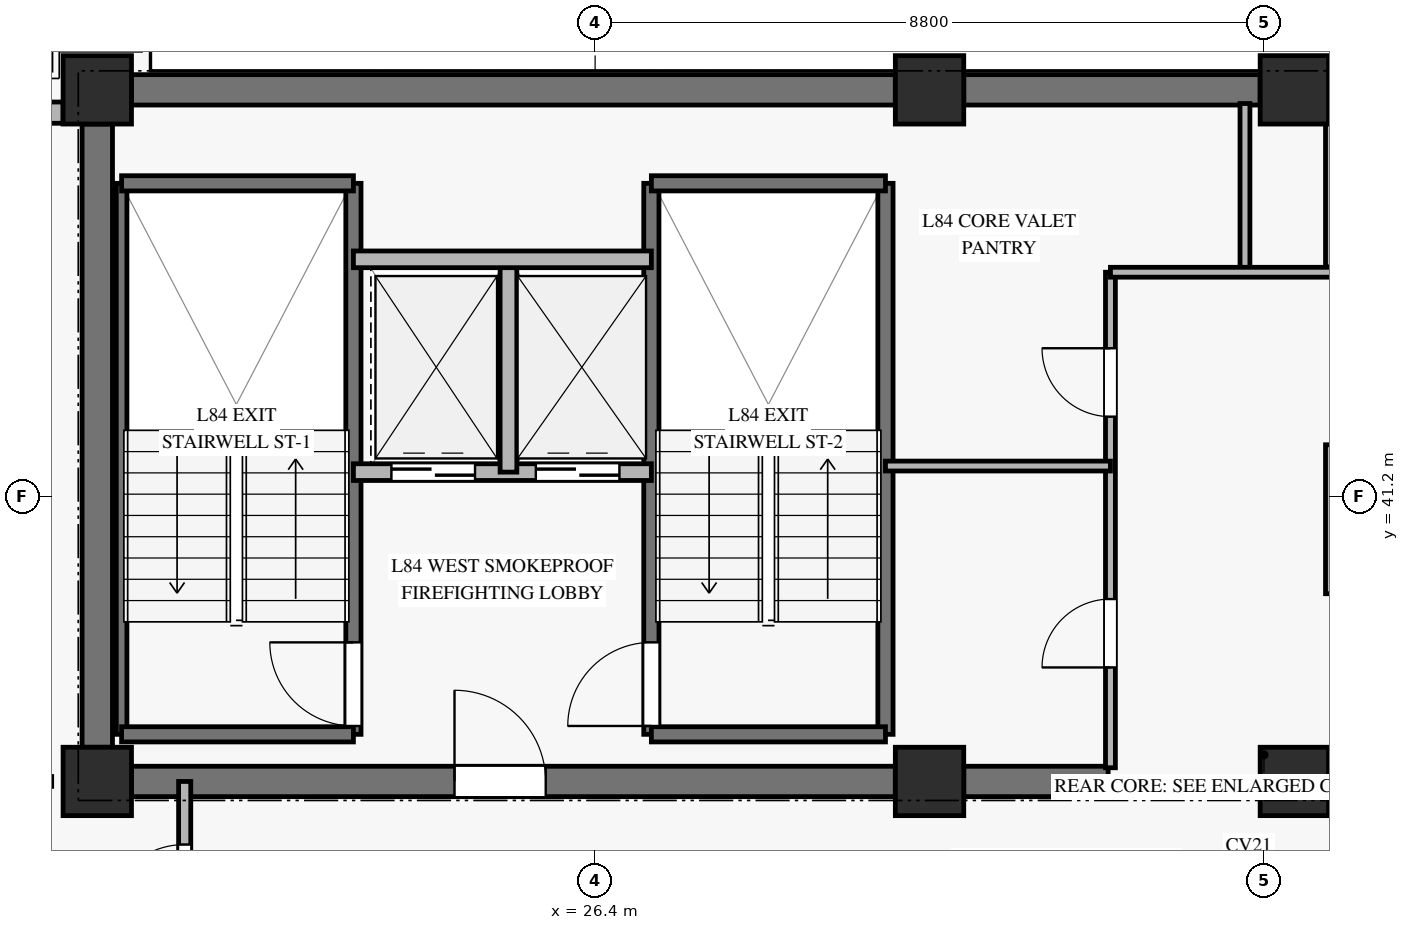
"""IFC4 building model, lengths in metres.
Left out: names, types, materials, properties, quantities, classifications, styles, units other than length and angle.
Written with IfcOpenShell. Run it as: python <this file> out.ifc"""

import sys

from ifc_helpers import new_model, si_unit, direction, frame, frame_2d, origin, origin_2d, place, context, subcontext, project, spatial, rectangle, extrude, source, transform, mapped, element, fill, save


model = new_model("IFC4")
c1 = context("Model", 3, precision=1e-05, world=origin(), true_north=direction((0.0, 1.0)))
c2 = subcontext(c1, "Body", "Model", "MODEL_VIEW")
j1 = project(units=[si_unit("LENGTHUNIT", "METRE"), si_unit("PLANEANGLEUNIT", "RADIAN")], contexts=[c1])
p1 = place(None, origin())
s1 = spatial("IfcSite", under=j1, at=p1, CompositionType="ELEMENT")
p2 = place(p1, origin())
s2 = spatial("IfcBuilding", under=s1, at=p2, CompositionType="ELEMENT")
p3 = place(p2, frame((0.0, 0.0, 324.4)))
s3 = spatial("IfcBuildingStorey", under=s2, at=p3, CompositionType="ELEMENT", Elevation=324.4)
m1 = source(origin(), c2, "Body", "SweptSolid", [
    extrude(rectangle(XDim=0.9, YDim=0.9, at=origin_2d()), origin(), (0.0, 0.0, 1.0), 3.12),
])
for number, where, z_axis, x_axis in (
    (1, (19.85, 37.45, 0.0), (0.0, 0.0, 1.0), (1.0, 0.0, 0.0)),
    (2, (19.85, 46.55, 0.0), (0.0, 0.0, 1.0), (1.0, 0.0, 0.0)),
    (3, (30.8, 37.45, 0.0), (0.0, 0.0, 1.0), (1.0, 0.0, 0.0)),
    (4, (30.8, 46.55, 0.0), (0.0, 0.0, 1.0), (1.0, 0.0, 0.0)),
    (5, (35.6, 37.45, 0.0), (0.0, 0.0, 1.0), (1.0, 0.0, 0.0)),
    (6, (35.6, 46.55, 0.0), (0.0, 0.0, 1.0), (1.0, 0.0, 0.0)),
):
    element("IfcColumn", number, at=place(p3, frame(where, z_axis=z_axis, x_axis=x_axis)), inside=s3, PredefinedType="PILASTER", context=c2, shape_type="MappedRepresentation", body=[
        mapped(m1, transform((0.0, 0.0, 0.0), x_axis=(1.0, 0.0, 0.0), y_axis=(0.0, 1.0, 0.0), z_axis=(0.0, 0.0, 1.0), scale=1.0)),
    ])
p4 = place(p3, frame((20.3, 46.55, 0.0), z_axis=(0.0, 0.0, 1.0), x_axis=(1.0, 0.0, 0.0)))
e7 = element("IfcWall", 7, at=p4, inside=s3, PredefinedType="SHEAR", context=c2, shape_type="SweptSolid", body=[
    extrude(rectangle(XDim=10.05, YDim=0.4, at=frame_2d((5.025, 0.0))), origin(), (0.0, 0.0, 1.0), 3.12),
])
p5 = place(p3, frame((31.25, 46.55, 0.0), z_axis=(0.0, 0.0, 1.0), x_axis=(1.0, 0.0, 0.0)))
e8 = element("IfcWall", 8, at=p5, inside=s3, PredefinedType="SHEAR", context=c2, shape_type="SweptSolid", body=[
    extrude(rectangle(XDim=3.9, YDim=0.4, at=frame_2d((1.95, 0.0))), origin(), (0.0, 0.0, 1.0), 3.12),
])
p6 = place(p3, frame((36.05, 46.55, 0.0), z_axis=(0.0, 0.0, 1.0), x_axis=(1.0, 0.0, 0.0)))
e9 = element("IfcWall", 9, at=p6, inside=s3, PredefinedType="SHEAR", context=c2, shape_type="SweptSolid", body=[
    extrude(rectangle(XDim=7.8, YDim=0.4, at=frame_2d((3.9, 0.0))), origin(), (0.0, 0.0, 1.0), 3.12),
])
p7 = place(p3, frame((20.3, 37.45, 0.0), z_axis=(0.0, 0.0, 1.0), x_axis=(1.0, 0.0, 0.0)))
e10 = element("IfcWall", 10, at=p7, inside=s3, PredefinedType="SHEAR", context=c2, shape_type="SweptSolid", body=[
    extrude(rectangle(XDim=10.05, YDim=0.4, at=frame_2d((5.025, 0.0))), origin(), (0.0, 0.0, 1.0), 3.12),
])
p8 = place(p7, frame((4.25, 0.0, 0.0)))
e11 = element("IfcOpeningElement", 11, at=p8, cuts=e10, PredefinedType="OPENING", context=c2, shape_type="SweptSolid", body=[
    extrude(rectangle(XDim=1.2, YDim=2.15, at=frame_2d((0.6, 1.075))), frame((0.0, 0.21, 0.0), z_axis=(0.0, -1.0, 0.0), x_axis=(1.0, 0.0, 0.0)), (0.0, 0.0, 1.0), 0.42),
])
p9 = place(p3, frame((31.25, 37.45, 0.0), z_axis=(0.0, 0.0, 1.0), x_axis=(1.0, 0.0, 0.0)))
e12 = element("IfcWall", 12, at=p9, inside=s3, PredefinedType="SHEAR", context=c2, shape_type="SweptSolid", body=[
    extrude(rectangle(XDim=1.9, YDim=0.4, at=frame_2d((0.95, 0.0))), origin(), (0.0, 0.0, 1.0), 3.12),
])
p10 = place(p3, frame((36.05, 37.45, 0.0), z_axis=(0.0, 0.0, 1.0), x_axis=(1.0, 0.0, 0.0)))
e13 = element("IfcWall", 13, at=p10, inside=s3, PredefinedType="SHEAR", context=c2, shape_type="SweptSolid", body=[
    extrude(rectangle(XDim=7.8, YDim=0.4, at=frame_2d((3.9, 0.0))), origin(), (0.0, 0.0, 1.0), 3.12),
])
p11 = place(p3, frame((19.85, 37.9, 0.0), z_axis=(0.0, 0.0, 1.0), x_axis=(0.0, 1.0, 0.0)))
e14 = element("IfcWall", 14, at=p11, inside=s3, PredefinedType="SHEAR", context=c2, shape_type="SweptSolid", body=[
    extrude(rectangle(XDim=8.2, YDim=0.4, at=frame_2d((4.1, 0.0))), origin(), (0.0, 0.0, 1.0), 3.12),
])
p12 = place(p3, frame((13.762, 46.25, 0.0), z_axis=(0.0, 0.0, 1.0), x_axis=(1.0, 0.0, 0.0)))
e15 = element("IfcWall", 15, at=p12, inside=s3, PredefinedType="SOLIDWALL", context=c2, shape_type="SweptSolid", body=[
    extrude(rectangle(XDim=5.638, YDim=0.28, at=frame_2d((2.819, 0.0))), origin(), (0.0, 0.0, 1.0), 2.75),
])
p13 = place(p12, frame((2.019, 0.0, 0.45)))
e16 = element("IfcOpeningElement", 16, at=p13, cuts=e15, PredefinedType="OPENING", context=c2, shape_type="SweptSolid", body=[
    extrude(rectangle(XDim=1.6, YDim=2.0, at=frame_2d((0.8, 1.0))), frame((0.0, 0.15, 0.0), z_axis=(0.0, -1.0, 0.0), x_axis=(1.0, 0.0, 0.0)), (0.0, 0.0, 1.0), 0.3),
])
p14 = place(p3, frame((20.17, 38.07, 0.0), z_axis=(0.0, 0.0, 1.0), x_axis=(0.0, 1.0, 0.0)))
e17 = element("IfcWall", 17, at=p14, inside=s3, PredefinedType="SOLIDWALL", context=c2, shape_type="SweptSolid", body=[
    extrude(rectangle(XDim=7.25, YDim=0.14, at=frame_2d((3.625, 0.0))), origin(), (0.0, 0.0, 1.0), 3.4),
])
p15 = place(p3, frame((23.22, 38.07, 0.0), z_axis=(0.0, 0.0, 1.0), x_axis=(0.0, 1.0, 0.0)))
e18 = element("IfcWall", 18, at=p15, inside=s3, PredefinedType="SOLIDWALL", context=c2, shape_type="SweptSolid", body=[
    extrude(rectangle(XDim=7.25, YDim=0.2, at=frame_2d((3.625, 0.0))), origin(), (0.0, 0.0, 1.0), 3.4),
])
p16 = place(p15, frame((0.11, 0.0, 0.0)))
e19 = element("IfcOpeningElement", 19, at=p16, cuts=e18, PredefinedType="OPENING", context=c2, shape_type="SweptSolid", body=[
    extrude(rectangle(XDim=1.1, YDim=2.15, at=frame_2d((0.55, 1.075))), frame((0.0, 0.11, 0.0), z_axis=(0.0, -1.0, 0.0), x_axis=(1.0, 0.0, 0.0)), (0.0, 0.0, 1.0), 0.22),
])
for number, where, z_axis, x_axis in (
    (20, (20.17, 45.32, 0.0), (0.0, 0.0, 1.0), (1.0, 0.0, 0.0)),
    (21, (20.17, 38.07, 0.0), (0.0, 0.0, 1.0), (1.0, 0.0, 0.0)),
):
    element("IfcWall", number, at=place(p3, frame(where, z_axis=z_axis, x_axis=x_axis)), inside=s3, PredefinedType="SOLIDWALL", context=c2, shape_type="SweptSolid", body=[
        extrude(rectangle(XDim=3.05, YDim=0.2, at=frame_2d((1.525, 0.0))), origin(), (0.0, 0.0, 1.0), 3.4),
    ])
p17 = place(p3, frame((27.14, 38.07, 0.0), z_axis=(0.0, 0.0, 1.0), x_axis=(0.0, 1.0, 0.0)))
e22 = element("IfcWall", 22, at=p17, inside=s3, PredefinedType="SOLIDWALL", context=c2, shape_type="SweptSolid", body=[
    extrude(rectangle(XDim=7.25, YDim=0.2, at=frame_2d((3.625, 0.0))), origin(), (0.0, 0.0, 1.0), 3.4),
])
p18 = place(p17, frame((0.11, 0.0, 0.0)))
e23 = element("IfcOpeningElement", 23, at=p18, cuts=e22, PredefinedType="OPENING", context=c2, shape_type="SweptSolid", body=[
    extrude(rectangle(XDim=1.1, YDim=2.15, at=frame_2d((0.55, 1.075))), frame((0.0, 0.11, 0.0), z_axis=(0.0, -1.0, 0.0), x_axis=(1.0, 0.0, 0.0)), (0.0, 0.0, 1.0), 0.22),
])
p19 = place(p3, frame((30.22, 38.07, 0.0), z_axis=(0.0, 0.0, 1.0), x_axis=(0.0, 1.0, 0.0)))
e24 = element("IfcWall", 24, at=p19, inside=s3, PredefinedType="SOLIDWALL", context=c2, shape_type="SweptSolid", body=[
    extrude(rectangle(XDim=7.25, YDim=0.2, at=frame_2d((3.625, 0.0))), origin(), (0.0, 0.0, 1.0), 3.4),
])
for number, where, z_axis, x_axis in (
    (25, (27.14, 45.32, 0.0), (0.0, 0.0, 1.0), (1.0, 0.0, 0.0)),
    (26, (27.14, 38.07, 0.0), (0.0, 0.0, 1.0), (1.0, 0.0, 0.0)),
):
    element("IfcWall", number, at=place(p3, frame(where, z_axis=z_axis, x_axis=x_axis)), inside=s3, PredefinedType="SOLIDWALL", context=c2, shape_type="SweptSolid", body=[
        extrude(rectangle(XDim=3.08, YDim=0.2, at=frame_2d((1.54, 0.0))), origin(), (0.0, 0.0, 1.0), 3.4),
    ])
p20 = place(p3, frame((23.22, 41.52, 0.0), z_axis=(0.0, 0.0, 1.0), x_axis=(1.0, 0.0, 0.0)))
e27 = element("IfcWall", 27, at=p20, inside=s3, PredefinedType="SOLIDWALL", context=c2, shape_type="SweptSolid", body=[
    extrude(rectangle(XDim=3.92, YDim=0.22, at=frame_2d((1.96, 0.0))), origin(), (0.0, 0.0, 1.0), 3.12),
])
p21 = place(p20, frame((0.5, 0.0, 0.0)))
e28 = element("IfcOpeningElement", 28, at=p21, cuts=e27, PredefinedType="OPENING", context=c2, shape_type="SweptSolid", body=[
    extrude(rectangle(XDim=1.1, YDim=2.2, at=frame_2d((0.55, 1.1))), frame((0.0, 0.12, 0.0), z_axis=(0.0, -1.0, 0.0), x_axis=(1.0, 0.0, 0.0)), (0.0, 0.0, 1.0), 0.24),
])
p22 = place(p20, frame((2.4, 0.0, 0.0)))
e29 = element("IfcOpeningElement", 29, at=p22, cuts=e27, PredefinedType="OPENING", context=c2, shape_type="SweptSolid", body=[
    extrude(rectangle(XDim=1.1, YDim=2.2, at=frame_2d((0.55, 1.1))), frame((0.0, 0.12, 0.0), z_axis=(0.0, -1.0, 0.0), x_axis=(1.0, 0.0, 0.0)), (0.0, 0.0, 1.0), 0.24),
])
p23 = place(p3, frame((25.26, 41.52, 0.0), z_axis=(0.0, 0.0, 1.0), x_axis=(0.0, 1.0, 0.0)))
e30 = element("IfcWall", 30, at=p23, inside=s3, PredefinedType="SOLIDWALL", context=c2, shape_type="SweptSolid", body=[
    extrude(rectangle(XDim=2.8, YDim=0.22, at=frame_2d((1.4, 0.0))), origin(), (0.0, 0.0, 1.0), 3.12),
])
p24 = place(p3, frame((23.22, 44.32, 0.0), z_axis=(0.0, 0.0, 1.0), x_axis=(1.0, 0.0, 0.0)))
e31 = element("IfcWall", 31, at=p24, inside=s3, PredefinedType="SOLIDWALL", context=c2, shape_type="SweptSolid", body=[
    extrude(rectangle(XDim=3.92, YDim=0.22, at=frame_2d((1.96, 0.0))), origin(), (0.0, 0.0, 1.0), 3.12),
])
p25 = place(p3, frame((36.12, 39.92, 0.0), z_axis=(0.0, 0.0, 1.0), x_axis=(0.0, 1.0, 0.0)))
e32 = element("IfcWall", 32, at=p25, inside=s3, PredefinedType="SOLIDWALL", context=c2, shape_type="SweptSolid", body=[
    extrude(rectangle(XDim=1.96, YDim=0.22, at=frame_2d((0.98, 0.0))), origin(), (0.0, 0.0, 1.0), 3.12),
])
p26 = place(p3, frame((36.12, 44.22, 0.0), z_axis=(0.0, 0.0, 1.0), x_axis=(0.0, 1.0, 0.0)))
e33 = element("IfcWall", 33, at=p26, inside=s3, PredefinedType="SOLIDWALL", context=c2, shape_type="SweptSolid", body=[
    extrude(rectangle(XDim=2.15, YDim=0.22, at=frame_2d((1.075, 0.0))), origin(), (0.0, 0.0, 1.0), 3.12),
])
p27 = place(p3, frame((33.18, 37.63, 0.0), z_axis=(0.0, 0.0, 1.0), x_axis=(0.0, 1.0, 0.0)))
e34 = element("IfcWall", 34, at=p27, inside=s3, PredefinedType="PARTITIONING", context=c2, shape_type="SweptSolid", body=[
    extrude(rectangle(XDim=6.52, YDim=0.13, at=frame_2d((3.26, 0.0))), origin(), (0.0, 0.0, 1.0), 2.22),
])
p28 = place(p27, frame((1.32, 0.0, 0.0)))
e35 = element("IfcOpeningElement", 35, at=p28, cuts=e34, PredefinedType="OPENING", context=c2, shape_type="SweptSolid", body=[
    extrude(rectangle(XDim=0.9, YDim=2.1, at=frame_2d((0.45, 1.05))), frame((0.0, 0.075, 0.0), z_axis=(0.0, -1.0, 0.0), x_axis=(1.0, 0.0, 0.0)), (0.0, 0.0, 1.0), 0.15),
])
p29 = place(p27, frame((4.62, 0.0, 0.0)))
e36 = element("IfcOpeningElement", 36, at=p29, cuts=e34, PredefinedType="OPENING", context=c2, shape_type="SweptSolid", body=[
    extrude(rectangle(XDim=0.9, YDim=2.1, at=frame_2d((0.45, 1.05))), frame((0.0, 0.075, 0.0), z_axis=(0.0, -1.0, 0.0), x_axis=(1.0, 0.0, 0.0)), (0.0, 0.0, 1.0), 0.15),
])
p30 = place(p3, frame((34.95, 44.15, 0.0), z_axis=(0.0, 0.0, 1.0), x_axis=(0.0, 1.0, 0.0)))
e37 = element("IfcWall", 37, at=p30, inside=s3, PredefinedType="PARTITIONING", context=c2, shape_type="SweptSolid", body=[
    extrude(rectangle(XDim=2.22, YDim=0.13, at=frame_2d((1.11, 0.0))), origin(), (0.0, 0.0, 1.0), 3.12),
])
p31 = place(p3, frame((33.18, 44.15, 0.0), z_axis=(0.0, 0.0, 1.0), x_axis=(1.0, 0.0, 0.0)))
e38 = element("IfcWall", 38, at=p31, inside=s3, PredefinedType="PARTITIONING", context=c2, shape_type="SweptSolid", body=[
    extrude(rectangle(XDim=2.94, YDim=0.13, at=frame_2d((1.47, 0.0))), origin(), (0.0, 0.0, 1.0), 2.405),
])
p32 = place(p3, frame((30.22, 41.6, 0.0), z_axis=(0.0, 0.0, 1.0), x_axis=(1.0, 0.0, 0.0)))
e39 = element("IfcWall", 39, at=p32, inside=s3, PredefinedType="PARTITIONING", context=c2, shape_type="SweptSolid", body=[
    extrude(rectangle(XDim=2.96, YDim=0.13, at=frame_2d((1.48, 0.0))), origin(), (0.0, 0.0, 1.0), 2.405),
])
p33 = place(p3, frame((21.0, 21.636, 0.0), z_axis=(0.0, 0.0, 1.0), x_axis=(0.0, 1.0, 0.0)))
e40 = element("IfcWall", 40, at=p33, inside=s3, PredefinedType="PARTITIONING", context=c2, shape_type="SweptSolid", body=[
    extrude(rectangle(XDim=15.814, YDim=0.16, at=frame_2d((7.907, 0.0))), origin(), (0.0, 0.0, 1.0), 2.705),
])
p34 = place(p33, frame((13.934, 0.0, 0.0)))
e41 = element("IfcOpeningElement", 41, at=p34, cuts=e40, PredefinedType="OPENING", context=c2, shape_type="SweptSolid", body=[
    extrude(rectangle(XDim=1.05, YDim=2.15, at=frame_2d((0.525, 1.075))), frame((0.0, 0.09, 0.0), z_axis=(0.0, -1.0, 0.0), x_axis=(1.0, 0.0, 0.0)), (0.0, 0.0, 1.0), 0.18),
])
m2 = source(origin(), c2, "Body", "SweptSolid", [
    extrude(rectangle(XDim=1.1, YDim=2.15, at=frame_2d((0.55, 1.075))), frame((0.0, 0.025, 0.0), z_axis=(0.0, -1.0, 0.0), x_axis=(1.0, 0.0, 0.0)), (0.0, 0.0, 1.0), 0.05),
])
p35 = place(p16, origin())
e42 = element("IfcDoor", 42, at=p35, inside=s3, OperationType="SINGLE_SWING_RIGHT", PredefinedType="DOOR", context=c2, shape_type="MappedRepresentation", body=[
    mapped(m2, transform((0.0, 0.0, 0.0), x_axis=(1.0, 0.0, 0.0), y_axis=(0.0, 1.0, 0.0), z_axis=(0.0, 0.0, 1.0), scale=1.0)),
])
fill(e19, e42)
p36 = place(p18, origin())
e43 = element("IfcDoor", 43, at=p36, inside=s3, OperationType="SINGLE_SWING_LEFT", PredefinedType="DOOR", context=c2, shape_type="MappedRepresentation", body=[
    mapped(m2, transform((0.0, 0.0, 0.0), x_axis=(1.0, 0.0, 0.0), y_axis=(0.0, 1.0, 0.0), z_axis=(0.0, 0.0, 1.0), scale=1.0)),
])
fill(e23, e43)
m3 = source(origin(), c2, "Body", "SweptSolid", [
    extrude(rectangle(XDim=1.1, YDim=2.2, at=frame_2d((0.55, 1.1))), frame((0.0, 0.025, 0.0), z_axis=(0.0, -1.0, 0.0), x_axis=(1.0, 0.0, 0.0)), (0.0, 0.0, 1.0), 0.05),
])
p37 = place(p21, origin())
e44 = element("IfcDoor", 44, at=p37, inside=s3, OperationType="SLIDING_TO_LEFT", PredefinedType="DOOR", context=c2, shape_type="MappedRepresentation", body=[
    mapped(m3, transform((0.0, 0.0, 0.0), x_axis=(1.0, 0.0, 0.0), y_axis=(0.0, 1.0, 0.0), z_axis=(0.0, 0.0, 1.0), scale=1.0)),
])
fill(e28, e44)
p38 = place(p22, origin())
e45 = element("IfcDoor", 45, at=p38, inside=s3, OperationType="SLIDING_TO_LEFT", PredefinedType="DOOR", context=c2, shape_type="MappedRepresentation", body=[
    mapped(m3, transform((0.0, 0.0, 0.0), x_axis=(1.0, 0.0, 0.0), y_axis=(0.0, 1.0, 0.0), z_axis=(0.0, 0.0, 1.0), scale=1.0)),
])
fill(e29, e45)
m4 = source(origin(), c2, "Body", "SweptSolid", [
    extrude(rectangle(XDim=1.2, YDim=2.15, at=frame_2d((0.6, 1.075))), frame((0.0, 0.025, 0.0), z_axis=(0.0, -1.0, 0.0), x_axis=(1.0, 0.0, 0.0)), (0.0, 0.0, 1.0), 0.05),
])
p39 = place(p8, origin())
e46 = element("IfcDoor", 46, at=p39, inside=s3, OperationType="SINGLE_SWING_LEFT", PredefinedType="DOOR", context=c2, shape_type="MappedRepresentation", body=[
    mapped(m4, transform((0.0, 0.0, 0.0), x_axis=(1.0, 0.0, 0.0), y_axis=(0.0, 1.0, 0.0), z_axis=(0.0, 0.0, 1.0), scale=1.0)),
])
fill(e11, e46)
m5 = source(origin(), c2, "Body", "SweptSolid", [
    extrude(rectangle(XDim=0.9, YDim=2.1, at=frame_2d((0.45, 1.05))), frame((0.0, 0.025, 0.0), z_axis=(0.0, -1.0, 0.0), x_axis=(1.0, 0.0, 0.0)), (0.0, 0.0, 1.0), 0.05),
])
p40 = place(p28, origin())
e47 = element("IfcDoor", 47, at=p40, inside=s3, OperationType="SINGLE_SWING_LEFT", PredefinedType="DOOR", context=c2, shape_type="MappedRepresentation", body=[
    mapped(m5, transform((0.0, 0.0, 0.0), x_axis=(1.0, 0.0, 0.0), y_axis=(0.0, 1.0, 0.0), z_axis=(0.0, 0.0, 1.0), scale=1.0)),
])
fill(e35, e47)
p41 = place(p29, origin())
e48 = element("IfcDoor", 48, at=p41, inside=s3, OperationType="SINGLE_SWING_RIGHT", PredefinedType="DOOR", context=c2, shape_type="MappedRepresentation", body=[
    mapped(m5, transform((0.0, 0.0, 0.0), x_axis=(1.0, 0.0, 0.0), y_axis=(0.0, 1.0, 0.0), z_axis=(0.0, 0.0, 1.0), scale=1.0)),
])
fill(e36, e48)
m6 = source(origin(), c2, "Body", "SweptSolid", [
    extrude(rectangle(XDim=1.05, YDim=2.15, at=frame_2d((0.525, 1.075))), frame((0.0, 0.025, 0.0), z_axis=(0.0, -1.0, 0.0), x_axis=(1.0, 0.0, 0.0)), (0.0, 0.0, 1.0), 0.05),
])
p42 = place(p34, origin())
e49 = element("IfcDoor", 49, at=p42, inside=s3, OperationType="SINGLE_SWING_LEFT", PredefinedType="DOOR", context=c2, shape_type="MappedRepresentation", body=[
    mapped(m6, transform((0.0, 0.0, 0.0), x_axis=(1.0, 0.0, 0.0), y_axis=(0.0, 1.0, 0.0), z_axis=(0.0, 0.0, 1.0), scale=1.0)),
])
fill(e41, e49)
save(model, sys.argv[1])
